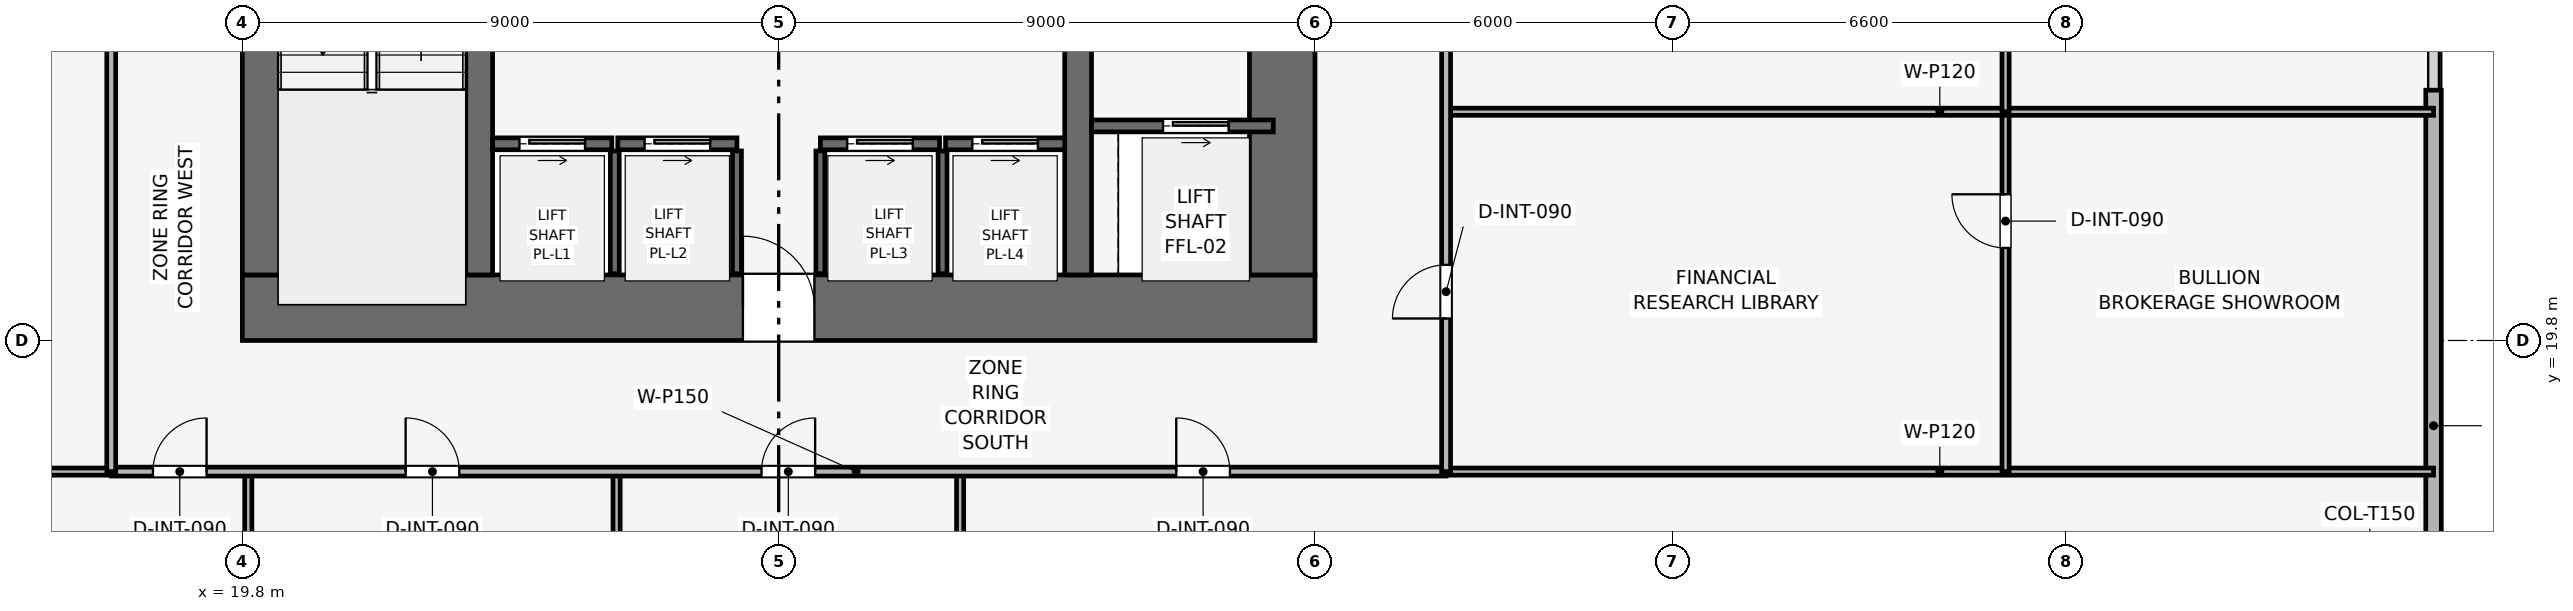
"""IFC4 building model, lengths in metres.
Left out: names, types, materials, properties, quantities, classifications, styles, units other than length and angle.
Written with IfcOpenShell. Run it as: python <this file> out.ifc"""

import sys

from ifc_helpers import new_model, si_unit, direction, frame, frame_2d, origin, place, context, subcontext, project, spatial, rectangle, extrude, element, fill, save


model = new_model("IFC4")
c1 = context("Model", 3, precision=1e-05, world=origin(), true_north=direction((0.0, 1.0)))
c2 = subcontext(c1, "Body", "Model", "MODEL_VIEW")
j1 = project(units=[si_unit("LENGTHUNIT", "METRE"), si_unit("PLANEANGLEUNIT", "RADIAN")], contexts=[c1])
p1 = place(None, origin())
s1 = spatial("IfcSite", under=j1, at=p1, CompositionType="ELEMENT")
p2 = place(p1, origin())
s2 = spatial("IfcBuilding", under=s1, at=p2, CompositionType="ELEMENT")
p3 = place(p2, frame((0.0, 0.0, 96.3)))
s3 = spatial("IfcBuildingStorey", under=s2, at=p3, CompositionType="ELEMENT", Elevation=96.3)
p4 = place(p3, frame((19.8, 20.35, 0.0), z_axis=(0.0, 0.0, 1.0), x_axis=(1.0, 0.0, 0.0)))
e1 = element("IfcWall", 1, at=p4, inside=s3, PredefinedType="SHEAR", context=c2, shape_type="SweptSolid", body=[
    extrude(rectangle(XDim=18.0, YDim=1.1, at=frame_2d((9.0, 0.0))), origin(), (0.0, 0.0, 1.0), 3.9),
])
p5 = place(p4, frame((8.4, 0.0, 0.0)))
e2 = element("IfcOpeningElement", 2, at=p5, cuts=e1, PredefinedType="OPENING", context=c2, shape_type="SweptSolid", body=[
    extrude(rectangle(XDim=1.2, YDim=2.2, at=frame_2d((0.6, 1.1))), frame((0.0, 0.56, 0.0), z_axis=(0.0, -1.0, 0.0), x_axis=(1.0, 0.0, 0.0)), (0.0, 0.0, 1.0), 1.12),
])
p6 = place(p3, frame((20.35, 20.9, 0.0), z_axis=(0.0, 0.0, 1.0), x_axis=(0.0, 1.0, 0.0)))
e3 = element("IfcWall", 3, at=p6, inside=s3, PredefinedType="SHEAR", context=c2, shape_type="SweptSolid", body=[
    extrude(rectangle(XDim=15.8, YDim=1.1, at=frame_2d((7.9, 0.0))), origin(), (0.0, 0.0, 1.0), 3.9),
])
p7 = place(p6, frame((9.9, 0.0, 0.0)))
e4 = element("IfcOpeningElement", 4, at=p7, cuts=e3, PredefinedType="OPENING", context=c2, shape_type="SweptSolid", body=[
    extrude(rectangle(XDim=1.1, YDim=2.15, at=frame_2d((0.55, 1.075))), frame((0.0, 0.56, 0.0), z_axis=(0.0, -1.0, 0.0), x_axis=(1.0, 0.0, 0.0)), (0.0, 0.0, 1.0), 1.12),
])
p8 = place(p3, frame((37.25, 20.9, 0.0), z_axis=(0.0, 0.0, 1.0), x_axis=(0.0, 1.0, 0.0)))
e5 = element("IfcWall", 5, at=p8, inside=s3, PredefinedType="SHEAR", context=c2, shape_type="SweptSolid", body=[
    extrude(rectangle(XDim=15.8, YDim=1.1, at=frame_2d((7.9, 0.0))), origin(), (0.0, 0.0, 1.0), 3.9),
])
p9 = place(p8, frame((4.4, 0.0, 0.0)))
e6 = element("IfcOpeningElement", 6, at=p9, cuts=e5, PredefinedType="OPENING", context=c2, shape_type="SweptSolid", body=[
    extrude(rectangle(XDim=1.1, YDim=2.15, at=frame_2d((0.55, 1.075))), frame((0.0, 0.56, 0.0), z_axis=(0.0, -1.0, 0.0), x_axis=(1.0, 0.0, 0.0)), (0.0, 0.0, 1.0), 1.12),
])
for number, where, z_axis, x_axis in (
    (7, (23.775, 20.9, 0.0), (0.0, 0.0, 1.0), (0.0, 1.0, 0.0)),
    (8, (33.825, 20.9, 0.0), (0.0, 0.0, 1.0), (0.0, 1.0, 0.0)),
):
    element("IfcWall", number, at=place(p3, frame(where, z_axis=z_axis, x_axis=x_axis)), inside=s3, PredefinedType="SHEAR", context=c2, shape_type="SweptSolid", body=[
        extrude(rectangle(XDim=15.8, YDim=0.45, at=frame_2d((7.9, 0.0))), origin(), (0.0, 0.0, 1.0), 3.9),
    ])
p10 = place(p3, frame((56.57, 24.0, 0.0), z_axis=(0.0, 0.0, 1.0), x_axis=(0.0, -1.0, 0.0)))
e9 = element("IfcWall", 9, at=p10, inside=s3, PredefinedType="SOLIDWALL", context=c2, shape_type="SweptSolid", body=[
    extrude(rectangle(XDim=15.3, YDim=0.26, at=frame_2d((7.65, 0.0))), origin(), (0.0, 0.0, 1.0), 3.65),
])
p11 = place(p10, frame((11.25, 0.0, 0.9)))
e10 = element("IfcOpeningElement", 10, at=p11, cuts=e9, PredefinedType="OPENING", context=c2, shape_type="SweptSolid", body=[
    extrude(rectangle(XDim=3.8, YDim=1.9, at=frame_2d((1.9, 0.95))), frame((0.0, 0.14, 0.0), z_axis=(0.0, -1.0, 0.0), x_axis=(1.0, 0.0, 0.0)), (0.0, 0.0, 1.0), 0.28),
])
p12 = place(p3, frame((34.05, 23.4, 0.0), z_axis=(0.0, 0.0, 1.0), x_axis=(1.0, 0.0, 0.0)))
e11 = element("IfcWall", 11, at=p12, inside=s3, PredefinedType="SHEAR", context=c2, shape_type="SweptSolid", body=[
    extrude(rectangle(XDim=3.05, YDim=0.2, at=frame_2d((1.525, 0.0))), origin(), (0.0, 0.0, 1.0), 3.65),
])
p13 = place(p12, frame((1.2, 0.0, 0.0)))
e12 = element("IfcOpeningElement", 12, at=p13, cuts=e11, PredefinedType="OPENING", context=c2, shape_type="SweptSolid", body=[
    extrude(rectangle(XDim=1.1, YDim=2.15, at=frame_2d((0.55, 1.075))), frame((0.0, 0.11, 0.0), z_axis=(0.0, -1.0, 0.0), x_axis=(1.0, 0.0, 0.0)), (0.0, 0.0, 1.0), 0.22),
])
p14 = place(p3, frame((24.0, 23.1, 0.0), z_axis=(0.0, 0.0, 1.0), x_axis=(1.0, 0.0, 0.0)))
e13 = element("IfcWall", 13, at=p14, inside=s3, PredefinedType="SHEAR", context=c2, shape_type="SweptSolid", body=[
    extrude(rectangle(XDim=2.0, YDim=0.2, at=frame_2d((1.0, 0.0))), origin(), (0.0, 0.0, 1.0), 3.65),
])
p15 = place(p14, frame((0.45, 0.0, 0.0)))
e14 = element("IfcOpeningElement", 14, at=p15, cuts=e13, PredefinedType="OPENING", context=c2, shape_type="SweptSolid", body=[
    extrude(rectangle(XDim=1.1, YDim=2.15, at=frame_2d((0.55, 1.075))), frame((0.0, 0.11, 0.0), z_axis=(0.0, -1.0, 0.0), x_axis=(1.0, 0.0, 0.0)), (0.0, 0.0, 1.0), 0.22),
])
p16 = place(p3, frame((26.1, 23.1, 0.0), z_axis=(0.0, 0.0, 1.0), x_axis=(1.0, 0.0, 0.0)))
e15 = element("IfcWall", 15, at=p16, inside=s3, PredefinedType="SHEAR", context=c2, shape_type="SweptSolid", body=[
    extrude(rectangle(XDim=2.0, YDim=0.2, at=frame_2d((1.0, 0.0))), origin(), (0.0, 0.0, 1.0), 3.65),
])
p17 = place(p16, frame((0.45, 0.0, 0.0)))
e16 = element("IfcOpeningElement", 16, at=p17, cuts=e15, PredefinedType="OPENING", context=c2, shape_type="SweptSolid", body=[
    extrude(rectangle(XDim=1.1, YDim=2.15, at=frame_2d((0.55, 1.075))), frame((0.0, 0.11, 0.0), z_axis=(0.0, -1.0, 0.0), x_axis=(1.0, 0.0, 0.0)), (0.0, 0.0, 1.0), 0.22),
])
p18 = place(p3, frame((29.5, 23.1, 0.0), z_axis=(0.0, 0.0, 1.0), x_axis=(1.0, 0.0, 0.0)))
e17 = element("IfcWall", 17, at=p18, inside=s3, PredefinedType="SHEAR", context=c2, shape_type="SweptSolid", body=[
    extrude(rectangle(XDim=2.0, YDim=0.2, at=frame_2d((1.0, 0.0))), origin(), (0.0, 0.0, 1.0), 3.65),
])
p19 = place(p18, frame((0.45, 0.0, 0.0)))
e18 = element("IfcOpeningElement", 18, at=p19, cuts=e17, PredefinedType="OPENING", context=c2, shape_type="SweptSolid", body=[
    extrude(rectangle(XDim=1.1, YDim=2.15, at=frame_2d((0.55, 1.075))), frame((0.0, 0.11, 0.0), z_axis=(0.0, -1.0, 0.0), x_axis=(1.0, 0.0, 0.0)), (0.0, 0.0, 1.0), 0.22),
])
p20 = place(p3, frame((31.6, 23.1, 0.0), z_axis=(0.0, 0.0, 1.0), x_axis=(1.0, 0.0, 0.0)))
e19 = element("IfcWall", 19, at=p20, inside=s3, PredefinedType="SHEAR", context=c2, shape_type="SweptSolid", body=[
    extrude(rectangle(XDim=2.0, YDim=0.2, at=frame_2d((1.0, 0.0))), origin(), (0.0, 0.0, 1.0), 3.65),
])
p21 = place(p20, frame((0.45, 0.0, 0.0)))
e20 = element("IfcOpeningElement", 20, at=p21, cuts=e19, PredefinedType="OPENING", context=c2, shape_type="SweptSolid", body=[
    extrude(rectangle(XDim=1.1, YDim=2.15, at=frame_2d((0.55, 1.075))), frame((0.0, 0.11, 0.0), z_axis=(0.0, -1.0, 0.0), x_axis=(1.0, 0.0, 0.0)), (0.0, 0.0, 1.0), 0.22),
])
for number, where, z_axis, x_axis in (
    (21, (26.05, 20.92, 0.0), (0.0, 0.0, 1.0), (0.0, 1.0, 0.0)),
    (22, (28.1, 20.92, 0.0), (0.0, 0.0, 1.0), (0.0, 1.0, 0.0)),
    (23, (29.5, 20.92, 0.0), (0.0, 0.0, 1.0), (0.0, 1.0, 0.0)),
    (24, (31.55, 20.92, 0.0), (0.0, 0.0, 1.0), (0.0, 1.0, 0.0)),
):
    element("IfcWall", number, at=place(p3, frame(where, z_axis=z_axis, x_axis=x_axis)), inside=s3, PredefinedType="SHEAR", context=c2, shape_type="SweptSolid", body=[
        extrude(rectangle(XDim=2.06, YDim=0.15, at=frame_2d((1.03, 0.0))), origin(), (0.0, 0.0, 1.0), 3.65),
    ])
for number, where, z_axis, x_axis in (
    (25, (19.9, 1.03, 0.0), (0.0, 0.0, 1.0), (0.0, 1.0, 0.0)),
    (26, (26.08, 1.03, 0.0), (0.0, 0.0, 1.0), (0.0, 1.0, 0.0)),
    (27, (31.845, 1.03, 0.0), (0.0, 0.0, 1.0), (0.0, 1.0, 0.0)),
    (28, (1.03, 17.6, 0.0), (0.0, 0.0, 1.0), (1.0, 0.0, 0.0)),
    (29, (40.0, 17.6, 0.0), (0.0, 0.0, 1.0), (1.0, 0.0, 0.0)),
):
    element("IfcWall", number, at=place(p3, frame(where, z_axis=z_axis, x_axis=x_axis)), inside=s3, PredefinedType="PARTITIONING", context=c2, shape_type="SweptSolid", body=[
        extrude(rectangle(XDim=16.57, YDim=0.12, at=frame_2d((8.285, 0.0))), origin(), (0.0, 0.0, 1.0), 2.935),
    ])
p22 = place(p3, frame((49.388, 17.6, 0.0), z_axis=(0.0, 0.0, 1.0), x_axis=(0.0, 1.0, 0.0)))
e30 = element("IfcWall", 30, at=p22, inside=s3, PredefinedType="PARTITIONING", context=c2, shape_type="SweptSolid", body=[
    extrude(rectangle(XDim=6.038, YDim=0.12, at=frame_2d((3.019, 0.0))), origin(), (0.0, 0.0, 1.0), 3.085),
])
p23 = place(p22, frame((3.753, 0.0, 0.0)))
e31 = element("IfcOpeningElement", 31, at=p23, cuts=e30, PredefinedType="OPENING", context=c2, shape_type="SweptSolid", body=[
    extrude(rectangle(XDim=0.9, YDim=2.1, at=frame_2d((0.45, 1.05))), frame((0.0, 0.07, 0.0), z_axis=(0.0, -1.0, 0.0), x_axis=(1.0, 0.0, 0.0)), (0.0, 0.0, 1.0), 0.14),
])
p24 = place(p3, frame((40.0, 23.638, 0.0), z_axis=(0.0, 0.0, 1.0), x_axis=(1.0, 0.0, 0.0)))
e32 = element("IfcWall", 32, at=p24, inside=s3, PredefinedType="PARTITIONING", context=c2, shape_type="SweptSolid", body=[
    extrude(rectangle(XDim=16.57, YDim=0.12, at=frame_2d((8.285, 0.0))), origin(), (0.0, 0.0, 1.0), 2.935),
])
p25 = place(p3, frame((49.388, 23.638, 0.0), z_axis=(0.0, 0.0, 1.0), x_axis=(0.0, 1.0, 0.0)))
e33 = element("IfcWall", 33, at=p25, inside=s3, PredefinedType="PARTITIONING", context=c2, shape_type="SweptSolid", body=[
    extrude(rectangle(XDim=16.362, YDim=0.12, at=frame_2d((8.181, 0.0))), origin(), (0.0, 0.0, 1.0), 3.085),
])
p26 = place(p25, frame((11.496, 0.0, 0.0)))
e34 = element("IfcOpeningElement", 34, at=p26, cuts=e33, PredefinedType="OPENING", context=c2, shape_type="SweptSolid", body=[
    extrude(rectangle(XDim=0.9, YDim=2.1, at=frame_2d((0.45, 1.05))), frame((0.0, 0.07, 0.0), z_axis=(0.0, -1.0, 0.0), x_axis=(1.0, 0.0, 0.0)), (0.0, 0.0, 1.0), 0.14),
])
p27 = place(p3, frame((17.6, 17.6, 0.0), z_axis=(0.0, 0.0, 1.0), x_axis=(1.0, 0.0, 0.0)))
e35 = element("IfcWall", 35, at=p27, inside=s3, PredefinedType="PARTITIONING", context=c2, shape_type="SweptSolid", body=[
    extrude(rectangle(XDim=22.4, YDim=0.15, at=frame_2d((11.2, 0.0))), origin(), (0.0, 0.0, 1.0), 3.085),
])
p28 = place(p27, frame((0.7, 0.0, 0.0)))
e36 = element("IfcOpeningElement", 36, at=p28, cuts=e35, PredefinedType="OPENING", context=c2, shape_type="SweptSolid", body=[
    extrude(rectangle(XDim=0.9, YDim=2.1, at=frame_2d((0.45, 1.05))), frame((0.0, 0.085, 0.0), z_axis=(0.0, -1.0, 0.0), x_axis=(1.0, 0.0, 0.0)), (0.0, 0.0, 1.0), 0.17),
])
p29 = place(p27, frame((4.94, 0.0, 0.0)))
e37 = element("IfcOpeningElement", 37, at=p29, cuts=e35, PredefinedType="OPENING", context=c2, shape_type="SweptSolid", body=[
    extrude(rectangle(XDim=0.9, YDim=2.1, at=frame_2d((0.45, 1.05))), frame((0.0, 0.085, 0.0), z_axis=(0.0, -1.0, 0.0), x_axis=(1.0, 0.0, 0.0)), (0.0, 0.0, 1.0), 0.17),
])
p30 = place(p27, frame((10.912, 0.0, 0.0)))
e38 = element("IfcOpeningElement", 38, at=p30, cuts=e35, PredefinedType="OPENING", context=c2, shape_type="SweptSolid", body=[
    extrude(rectangle(XDim=0.9, YDim=2.1, at=frame_2d((0.45, 1.05))), frame((0.0, 0.085, 0.0), z_axis=(0.0, -1.0, 0.0), x_axis=(1.0, 0.0, 0.0)), (0.0, 0.0, 1.0), 0.17),
])
p31 = place(p27, frame((17.872, 0.0, 0.0)))
e39 = element("IfcOpeningElement", 39, at=p31, cuts=e35, PredefinedType="OPENING", context=c2, shape_type="SweptSolid", body=[
    extrude(rectangle(XDim=0.9, YDim=2.1, at=frame_2d((0.45, 1.05))), frame((0.0, 0.085, 0.0), z_axis=(0.0, -1.0, 0.0), x_axis=(1.0, 0.0, 0.0)), (0.0, 0.0, 1.0), 0.17),
])
p32 = place(p3, frame((17.6, 17.6, 0.0), z_axis=(0.0, 0.0, 1.0), x_axis=(0.0, 1.0, 0.0)))
e40 = element("IfcWall", 40, at=p32, inside=s3, PredefinedType="PARTITIONING", context=c2, shape_type="SweptSolid", body=[
    extrude(rectangle(XDim=22.4, YDim=0.15, at=frame_2d((11.2, 0.0))), origin(), (0.0, 0.0, 1.0), 3.085),
])
p33 = place(p32, frame((10.75, 0.0, 0.0)))
e41 = element("IfcOpeningElement", 41, at=p33, cuts=e40, PredefinedType="OPENING", context=c2, shape_type="SweptSolid", body=[
    extrude(rectangle(XDim=0.9, YDim=2.1, at=frame_2d((0.45, 1.05))), frame((0.0, 0.085, 0.0), z_axis=(0.0, -1.0, 0.0), x_axis=(1.0, 0.0, 0.0)), (0.0, 0.0, 1.0), 0.17),
])
p34 = place(p3, frame((40.0, 17.6, 0.0), z_axis=(0.0, 0.0, 1.0), x_axis=(0.0, 1.0, 0.0)))
e42 = element("IfcWall", 42, at=p34, inside=s3, PredefinedType="PARTITIONING", context=c2, shape_type="SweptSolid", body=[
    extrude(rectangle(XDim=22.4, YDim=0.15, at=frame_2d((11.2, 0.0))), origin(), (0.0, 0.0, 1.0), 3.085),
])
p35 = place(p34, frame((2.569, 0.0, 0.0)))
e43 = element("IfcOpeningElement", 43, at=p35, cuts=e42, PredefinedType="OPENING", context=c2, shape_type="SweptSolid", body=[
    extrude(rectangle(XDim=0.9, YDim=2.1, at=frame_2d((0.45, 1.05))), frame((0.0, 0.085, 0.0), z_axis=(0.0, -1.0, 0.0), x_axis=(1.0, 0.0, 0.0)), (0.0, 0.0, 1.0), 0.17),
])
p36 = place(p34, frame((13.769, 0.0, 0.0)))
e44 = element("IfcOpeningElement", 44, at=p36, cuts=e42, PredefinedType="OPENING", context=c2, shape_type="SweptSolid", body=[
    extrude(rectangle(XDim=0.9, YDim=2.1, at=frame_2d((0.45, 1.05))), frame((0.0, 0.085, 0.0), z_axis=(0.0, -1.0, 0.0), x_axis=(1.0, 0.0, 0.0)), (0.0, 0.0, 1.0), 0.17),
])
p37 = place(p13, origin())
e45 = element("IfcDoor", 45, at=p37, inside=s3, OperationType="SLIDING_TO_RIGHT", PredefinedType="DOOR", context=c2, shape_type="SweptSolid", body=[
    extrude(rectangle(XDim=1.1, YDim=2.15, at=frame_2d((0.55, 1.075))), frame((0.0, 0.025, 0.0), z_axis=(0.0, -1.0, 0.0), x_axis=(1.0, 0.0, 0.0)), (0.0, 0.0, 1.0), 0.05),
])
fill(e12, e45)
p38 = place(p15, origin())
e46 = element("IfcDoor", 46, at=p38, inside=s3, OperationType="SLIDING_TO_RIGHT", PredefinedType="DOOR", context=c2, shape_type="SweptSolid", body=[
    extrude(rectangle(XDim=1.1, YDim=2.15, at=frame_2d((0.55, 1.075))), frame((0.0, 0.025, 0.0), z_axis=(0.0, -1.0, 0.0), x_axis=(1.0, 0.0, 0.0)), (0.0, 0.0, 1.0), 0.05),
])
fill(e14, e46)
p39 = place(p17, origin())
e47 = element("IfcDoor", 47, at=p39, inside=s3, OperationType="SLIDING_TO_RIGHT", PredefinedType="DOOR", context=c2, shape_type="SweptSolid", body=[
    extrude(rectangle(XDim=1.1, YDim=2.15, at=frame_2d((0.55, 1.075))), frame((0.0, 0.025, 0.0), z_axis=(0.0, -1.0, 0.0), x_axis=(1.0, 0.0, 0.0)), (0.0, 0.0, 1.0), 0.05),
])
fill(e16, e47)
p40 = place(p19, origin())
e48 = element("IfcDoor", 48, at=p40, inside=s3, OperationType="SLIDING_TO_RIGHT", PredefinedType="DOOR", context=c2, shape_type="SweptSolid", body=[
    extrude(rectangle(XDim=1.1, YDim=2.15, at=frame_2d((0.55, 1.075))), frame((0.0, 0.025, 0.0), z_axis=(0.0, -1.0, 0.0), x_axis=(1.0, 0.0, 0.0)), (0.0, 0.0, 1.0), 0.05),
])
fill(e18, e48)
p41 = place(p21, origin())
e49 = element("IfcDoor", 49, at=p41, inside=s3, OperationType="SLIDING_TO_RIGHT", PredefinedType="DOOR", context=c2, shape_type="SweptSolid", body=[
    extrude(rectangle(XDim=1.1, YDim=2.15, at=frame_2d((0.55, 1.075))), frame((0.0, 0.025, 0.0), z_axis=(0.0, -1.0, 0.0), x_axis=(1.0, 0.0, 0.0)), (0.0, 0.0, 1.0), 0.05),
])
fill(e20, e49)
p42 = place(p23, origin())
e50 = element("IfcDoor", 50, at=p42, inside=s3, OperationType="SINGLE_SWING_RIGHT", PredefinedType="DOOR", context=c2, shape_type="SweptSolid", body=[
    extrude(rectangle(XDim=0.9, YDim=2.1, at=frame_2d((0.45, 1.05))), frame((0.0, 0.025, 0.0), z_axis=(0.0, -1.0, 0.0), x_axis=(1.0, 0.0, 0.0)), (0.0, 0.0, 1.0), 0.05),
])
fill(e31, e50)
p43 = place(p28, origin())
e51 = element("IfcDoor", 51, at=p43, inside=s3, OperationType="SINGLE_SWING_RIGHT", PredefinedType="DOOR", context=c2, shape_type="SweptSolid", body=[
    extrude(rectangle(XDim=0.9, YDim=2.1, at=frame_2d((0.45, 1.05))), frame((0.0, 0.025, 0.0), z_axis=(0.0, -1.0, 0.0), x_axis=(1.0, 0.0, 0.0)), (0.0, 0.0, 1.0), 0.05),
])
fill(e36, e51)
p44 = place(p29, origin())
e52 = element("IfcDoor", 52, at=p44, inside=s3, OperationType="SINGLE_SWING_LEFT", PredefinedType="DOOR", context=c2, shape_type="SweptSolid", body=[
    extrude(rectangle(XDim=0.9, YDim=2.1, at=frame_2d((0.45, 1.05))), frame((0.0, 0.025, 0.0), z_axis=(0.0, -1.0, 0.0), x_axis=(1.0, 0.0, 0.0)), (0.0, 0.0, 1.0), 0.05),
])
fill(e37, e52)
p45 = place(p30, origin())
e53 = element("IfcDoor", 53, at=p45, inside=s3, OperationType="SINGLE_SWING_RIGHT", PredefinedType="DOOR", context=c2, shape_type="SweptSolid", body=[
    extrude(rectangle(XDim=0.9, YDim=2.1, at=frame_2d((0.45, 1.05))), frame((0.0, 0.025, 0.0), z_axis=(0.0, -1.0, 0.0), x_axis=(1.0, 0.0, 0.0)), (0.0, 0.0, 1.0), 0.05),
])
fill(e38, e53)
p46 = place(p31, origin())
e54 = element("IfcDoor", 54, at=p46, inside=s3, OperationType="SINGLE_SWING_LEFT", PredefinedType="DOOR", context=c2, shape_type="SweptSolid", body=[
    extrude(rectangle(XDim=0.9, YDim=2.1, at=frame_2d((0.45, 1.05))), frame((0.0, 0.025, 0.0), z_axis=(0.0, -1.0, 0.0), x_axis=(1.0, 0.0, 0.0)), (0.0, 0.0, 1.0), 0.05),
])
fill(e39, e54)
p47 = place(p35, origin())
e55 = element("IfcDoor", 55, at=p47, inside=s3, OperationType="SINGLE_SWING_LEFT", PredefinedType="DOOR", context=c2, shape_type="SweptSolid", body=[
    extrude(rectangle(XDim=0.9, YDim=2.1, at=frame_2d((0.45, 1.05))), frame((0.0, 0.025, 0.0), z_axis=(0.0, -1.0, 0.0), x_axis=(1.0, 0.0, 0.0)), (0.0, 0.0, 1.0), 0.05),
])
fill(e43, e55)
p48 = place(p5, origin())
e56 = element("IfcDoor", 56, at=p48, inside=s3, OperationType="SINGLE_SWING_LEFT", PredefinedType="DOOR", context=c2, shape_type="SweptSolid", body=[
    extrude(rectangle(XDim=1.2, YDim=2.2, at=frame_2d((0.6, 1.1))), frame((0.0, 0.025, 0.0), z_axis=(0.0, -1.0, 0.0), x_axis=(1.0, 0.0, 0.0)), (0.0, 0.0, 1.0), 0.05),
])
fill(e2, e56)
save(model, sys.argv[1])
